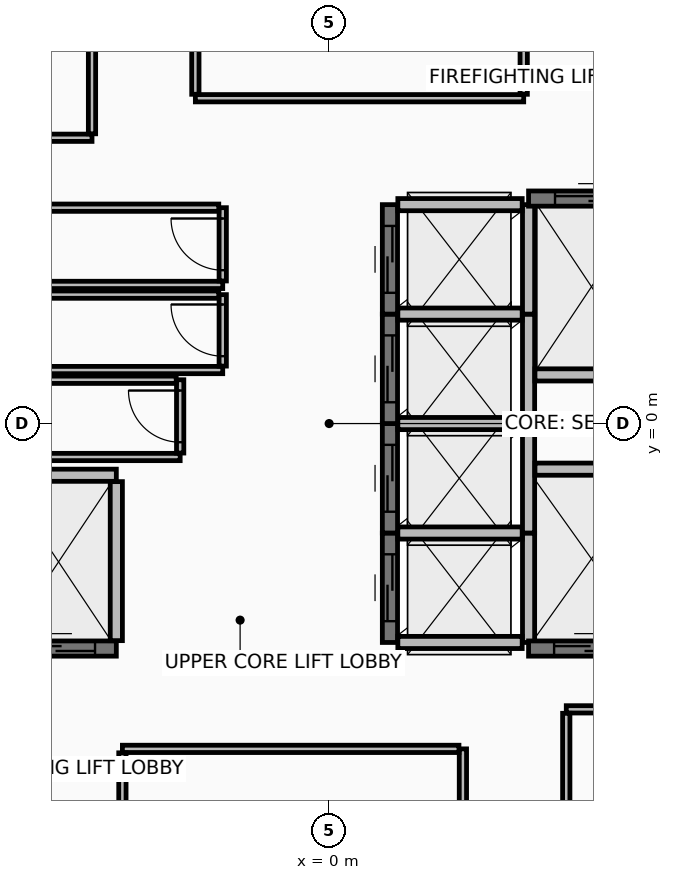
"""IFC4 building model, lengths in metres.
Left out: names, types, materials, properties, quantities, classifications, styles, units other than length and angle.
Written with IfcOpenShell. Run it as: python <this file> out.ifc"""

import sys

from ifc_helpers import new_model, si_unit, direction, frame, frame_2d, origin, place, context, subcontext, project, spatial, rectangle, extrude, element, fill, save


model = new_model("IFC4")
c1 = context("Model", 3, precision=1e-05, world=origin(), true_north=direction((0.0, 1.0)))
c2 = subcontext(c1, "Body", "Model", "MODEL_VIEW")
j1 = project(units=[si_unit("LENGTHUNIT", "METRE"), si_unit("PLANEANGLEUNIT", "RADIAN")], contexts=[c1])
p1 = place(None, origin())
s1 = spatial("IfcSite", under=j1, at=p1, CompositionType="ELEMENT")
p2 = place(p1, origin())
s2 = spatial("IfcBuilding", under=s1, at=p2, CompositionType="ELEMENT")
p3 = place(p2, frame((0.0, 0.0, 253.4)))
s3 = spatial("IfcBuildingStorey", under=s2, at=p3, CompositionType="ELEMENT", Elevation=253.4)
p4 = place(p3, frame((1.0, -3.6, 0.0), z_axis=(0.0, 0.0, 1.0), x_axis=(0.0, 1.0, 0.0)))
e1 = element("IfcWall", 1, at=p4, inside=s3, PredefinedType="SHEAR", context=c2, shape_type="SweptSolid", body=[
    extrude(rectangle(XDim=1.8, YDim=0.25, at=frame_2d((0.9, 0.0))), origin(), (0.0, 0.0, 1.0), 3.42),
])
p5 = place(p4, frame((0.35, 0.0, 0.0)))
e2 = element("IfcOpeningElement", 2, at=p5, cuts=e1, PredefinedType="OPENING", context=c2, shape_type="SweptSolid", body=[
    extrude(rectangle(XDim=1.1, YDim=2.2, at=frame_2d((0.55, 1.1))), frame((0.0, 0.135, 0.0), z_axis=(0.0, -1.0, 0.0), x_axis=(1.0, 0.0, 0.0)), (0.0, 0.0, 1.0), 0.27),
])
p6 = place(p3, frame((3.28, -3.6, 0.0), z_axis=(0.0, 0.0, 1.0), x_axis=(0.0, 1.0, 0.0)))
e3 = element("IfcWall", 3, at=p6, inside=s3, PredefinedType="PARTITIONING", context=c2, shape_type="SweptSolid", body=[
    extrude(rectangle(XDim=1.8, YDim=0.2, at=frame_2d((0.9, 0.0))), origin(), (0.0, 0.0, 1.0), 3.42),
])
for number, where, z_axis, x_axis in (
    (4, (1.13, -3.6, 0.0), (0.0, 0.0, 1.0), (1.0, 0.0, 0.0)),
    (5, (1.13, -1.8, 0.0), (0.0, 0.0, 1.0), (1.0, 0.0, 0.0)),
):
    element("IfcWall", number, at=place(p3, frame(where, z_axis=z_axis, x_axis=x_axis)), inside=s3, PredefinedType="PARTITIONING", context=c2, shape_type="SweptSolid", body=[
        extrude(rectangle(XDim=2.045, YDim=0.2, at=frame_2d((1.022, 0.0))), origin(), (0.0, 0.0, 1.0), 3.42),
    ])
p7 = place(p3, frame((1.0, -1.8, 0.0), z_axis=(0.0, 0.0, 1.0), x_axis=(0.0, 1.0, 0.0)))
e6 = element("IfcWall", 6, at=p7, inside=s3, PredefinedType="SHEAR", context=c2, shape_type="SweptSolid", body=[
    extrude(rectangle(XDim=1.8, YDim=0.25, at=frame_2d((0.9, 0.0))), origin(), (0.0, 0.0, 1.0), 3.42),
])
p8 = place(p7, frame((0.35, 0.0, 0.0)))
e7 = element("IfcOpeningElement", 7, at=p8, cuts=e6, PredefinedType="OPENING", context=c2, shape_type="SweptSolid", body=[
    extrude(rectangle(XDim=1.1, YDim=2.2, at=frame_2d((0.55, 1.1))), frame((0.0, 0.135, 0.0), z_axis=(0.0, -1.0, 0.0), x_axis=(1.0, 0.0, 0.0)), (0.0, 0.0, 1.0), 0.27),
])
p9 = place(p3, frame((3.28, -1.8, 0.0), z_axis=(0.0, 0.0, 1.0), x_axis=(0.0, 1.0, 0.0)))
e8 = element("IfcWall", 8, at=p9, inside=s3, PredefinedType="PARTITIONING", context=c2, shape_type="SweptSolid", body=[
    extrude(rectangle(XDim=1.8, YDim=0.2, at=frame_2d((0.9, 0.0))), origin(), (0.0, 0.0, 1.0), 3.42),
])
p10 = place(p3, frame((1.13, 0.0, 0.0), z_axis=(0.0, 0.0, 1.0), x_axis=(1.0, 0.0, 0.0)))
e9 = element("IfcWall", 9, at=p10, inside=s3, PredefinedType="PARTITIONING", context=c2, shape_type="SweptSolid", body=[
    extrude(rectangle(XDim=2.045, YDim=0.2, at=frame_2d((1.022, 0.0))), origin(), (0.0, 0.0, 1.0), 3.42),
])
p11 = place(p3, frame((1.0, 0.0, 0.0), z_axis=(0.0, 0.0, 1.0), x_axis=(0.0, 1.0, 0.0)))
e10 = element("IfcWall", 10, at=p11, inside=s3, PredefinedType="SHEAR", context=c2, shape_type="SweptSolid", body=[
    extrude(rectangle(XDim=1.8, YDim=0.25, at=frame_2d((0.9, 0.0))), origin(), (0.0, 0.0, 1.0), 3.42),
])
p12 = place(p11, frame((0.35, 0.0, 0.0)))
e11 = element("IfcOpeningElement", 11, at=p12, cuts=e10, PredefinedType="OPENING", context=c2, shape_type="SweptSolid", body=[
    extrude(rectangle(XDim=1.1, YDim=2.2, at=frame_2d((0.55, 1.1))), frame((0.0, 0.135, 0.0), z_axis=(0.0, -1.0, 0.0), x_axis=(1.0, 0.0, 0.0)), (0.0, 0.0, 1.0), 0.27),
])
p13 = place(p3, frame((3.28, 0.0, 0.0), z_axis=(0.0, 0.0, 1.0), x_axis=(0.0, 1.0, 0.0)))
e12 = element("IfcWall", 12, at=p13, inside=s3, PredefinedType="PARTITIONING", context=c2, shape_type="SweptSolid", body=[
    extrude(rectangle(XDim=1.8, YDim=0.2, at=frame_2d((0.9, 0.0))), origin(), (0.0, 0.0, 1.0), 3.42),
])
p14 = place(p3, frame((1.13, 1.8, 0.0), z_axis=(0.0, 0.0, 1.0), x_axis=(1.0, 0.0, 0.0)))
e13 = element("IfcWall", 13, at=p14, inside=s3, PredefinedType="PARTITIONING", context=c2, shape_type="SweptSolid", body=[
    extrude(rectangle(XDim=2.045, YDim=0.2, at=frame_2d((1.022, 0.0))), origin(), (0.0, 0.0, 1.0), 3.42),
])
p15 = place(p3, frame((1.0, 1.8, 0.0), z_axis=(0.0, 0.0, 1.0), x_axis=(0.0, 1.0, 0.0)))
e14 = element("IfcWall", 14, at=p15, inside=s3, PredefinedType="SHEAR", context=c2, shape_type="SweptSolid", body=[
    extrude(rectangle(XDim=1.8, YDim=0.25, at=frame_2d((0.9, 0.0))), origin(), (0.0, 0.0, 1.0), 3.42),
])
p16 = place(p15, frame((0.35, 0.0, 0.0)))
e15 = element("IfcOpeningElement", 15, at=p16, cuts=e14, PredefinedType="OPENING", context=c2, shape_type="SweptSolid", body=[
    extrude(rectangle(XDim=1.1, YDim=2.2, at=frame_2d((0.55, 1.1))), frame((0.0, 0.135, 0.0), z_axis=(0.0, -1.0, 0.0), x_axis=(1.0, 0.0, 0.0)), (0.0, 0.0, 1.0), 0.27),
])
p17 = place(p3, frame((3.28, 1.8, 0.0), z_axis=(0.0, 0.0, 1.0), x_axis=(0.0, 1.0, 0.0)))
e16 = element("IfcWall", 16, at=p17, inside=s3, PredefinedType="PARTITIONING", context=c2, shape_type="SweptSolid", body=[
    extrude(rectangle(XDim=1.8, YDim=0.2, at=frame_2d((0.9, 0.0))), origin(), (0.0, 0.0, 1.0), 3.42),
])
p18 = place(p3, frame((1.13, 3.6, 0.0), z_axis=(0.0, 0.0, 1.0), x_axis=(1.0, 0.0, 0.0)))
e17 = element("IfcWall", 17, at=p18, inside=s3, PredefinedType="PARTITIONING", context=c2, shape_type="SweptSolid", body=[
    extrude(rectangle(XDim=2.045, YDim=0.2, at=frame_2d((1.022, 0.0))), origin(), (0.0, 0.0, 1.0), 2.715),
])
p19 = place(p3, frame((-5.4, -3.7, 0.0), z_axis=(0.0, 0.0, 1.0), x_axis=(1.0, 0.0, 0.0)))
e18 = element("IfcWall", 18, at=p19, inside=s3, PredefinedType="SHEAR", context=c2, shape_type="SweptSolid", body=[
    extrude(rectangle(XDim=1.9, YDim=0.25, at=frame_2d((0.95, 0.0))), origin(), (0.0, 0.0, 1.0), 3.42),
])
p20 = place(p19, frame((0.35, 0.0, 0.0)))
e19 = element("IfcOpeningElement", 19, at=p20, cuts=e18, PredefinedType="OPENING", context=c2, shape_type="SweptSolid", body=[
    extrude(rectangle(XDim=1.2, YDim=2.2, at=frame_2d((0.6, 1.1))), frame((0.0, 0.135, 0.0), z_axis=(0.0, -1.0, 0.0), x_axis=(1.0, 0.0, 0.0)), (0.0, 0.0, 1.0), 0.27),
])
p21 = place(p3, frame((-5.27, -0.85, 0.0), z_axis=(0.0, 0.0, 1.0), x_axis=(1.0, 0.0, 0.0)))
e20 = element("IfcWall", 20, at=p21, inside=s3, PredefinedType="PARTITIONING", context=c2, shape_type="SweptSolid", body=[
    extrude(rectangle(XDim=1.77, YDim=0.2, at=frame_2d((0.885, 0.0))), origin(), (0.0, 0.0, 1.0), 3.42),
])
p22 = place(p3, frame((-3.5, -3.57, 0.0), z_axis=(0.0, 0.0, 1.0), x_axis=(0.0, 1.0, 0.0)))
e21 = element("IfcWall", 21, at=p22, inside=s3, PredefinedType="PARTITIONING", context=c2, shape_type="SweptSolid", body=[
    extrude(rectangle(XDim=2.615, YDim=0.2, at=frame_2d((1.308, 0.0))), origin(), (0.0, 0.0, 1.0), 3.42),
])
p23 = place(p3, frame((3.28, 3.7, 0.0), z_axis=(0.0, 0.0, 1.0), x_axis=(1.0, 0.0, 0.0)))
e22 = element("IfcWall", 22, at=p23, inside=s3, PredefinedType="SHEAR", context=c2, shape_type="SweptSolid", body=[
    extrude(rectangle(XDim=2.07, YDim=0.25, at=frame_2d((1.035, 0.0))), origin(), (0.0, 0.0, 1.0), 3.42),
])
p24 = place(p23, frame((0.435, 0.0, 0.0)))
e23 = element("IfcOpeningElement", 23, at=p24, cuts=e22, PredefinedType="OPENING", context=c2, shape_type="SweptSolid", body=[
    extrude(rectangle(XDim=1.2, YDim=2.2, at=frame_2d((0.6, 1.1))), frame((0.0, 0.135, 0.0), z_axis=(0.0, -1.0, 0.0), x_axis=(1.0, 0.0, 0.0)), (0.0, 0.0, 1.0), 0.27),
])
p25 = place(p3, frame((3.385, 0.8, 0.0), z_axis=(0.0, 0.0, 1.0), x_axis=(1.0, 0.0, 0.0)))
e24 = element("IfcWall", 24, at=p25, inside=s3, PredefinedType="PARTITIONING", context=c2, shape_type="SweptSolid", body=[
    extrude(rectangle(XDim=1.835, YDim=0.2, at=frame_2d((0.917, 0.0))), origin(), (0.0, 0.0, 1.0), 3.42),
])
p26 = place(p3, frame((3.28, -3.7, 0.0), z_axis=(0.0, 0.0, 1.0), x_axis=(1.0, 0.0, 0.0)))
e25 = element("IfcWall", 25, at=p26, inside=s3, PredefinedType="SHEAR", context=c2, shape_type="SweptSolid", body=[
    extrude(rectangle(XDim=1.94, YDim=0.25, at=frame_2d((0.97, 0.0))), origin(), (0.0, 0.0, 1.0), 3.42),
])
p27 = place(p26, frame((0.42, 0.0, 0.0)))
e26 = element("IfcOpeningElement", 26, at=p27, cuts=e25, PredefinedType="OPENING", context=c2, shape_type="SweptSolid", body=[
    extrude(rectangle(XDim=1.1, YDim=2.2, at=frame_2d((0.55, 1.1))), frame((0.0, 0.135, 0.0), z_axis=(0.0, -1.0, 0.0), x_axis=(1.0, 0.0, 0.0)), (0.0, 0.0, 1.0), 0.27),
])
p28 = place(p3, frame((3.385, -0.75, 0.0), z_axis=(0.0, 0.0, 1.0), x_axis=(1.0, 0.0, 0.0)))
e27 = element("IfcWall", 27, at=p28, inside=s3, PredefinedType="PARTITIONING", context=c2, shape_type="SweptSolid", body=[
    extrude(rectangle(XDim=1.835, YDim=0.2, at=frame_2d((0.917, 0.0))), origin(), (0.0, 0.0, 1.0), 3.42),
])
p29 = place(p3, frame((-5.22, 2.28, 0.0), z_axis=(0.0, 0.0, 1.0), x_axis=(1.0, 0.0, 0.0)))
e28 = element("IfcWall", 28, at=p29, inside=s3, PredefinedType="PARTITIONING", context=c2, shape_type="SweptSolid", body=[
    extrude(rectangle(XDim=3.47, YDim=0.12, at=frame_2d((1.735, 0.0))), origin(), (0.0, 0.0, 1.0), 3.42),
])
p30 = place(p3, frame((-1.75, 2.345, 0.0), z_axis=(0.0, 0.0, 1.0), x_axis=(0.0, 1.0, 0.0)))
e29 = element("IfcWall", 29, at=p30, inside=s3, PredefinedType="PARTITIONING", context=c2, shape_type="SweptSolid", body=[
    extrude(rectangle(XDim=1.205, YDim=0.12, at=frame_2d((0.603, 0.0))), origin(), (0.0, 0.0, 1.0), 3.42),
])
p31 = place(p30, frame((0.177, 0.0, 0.0)))
e30 = element("IfcOpeningElement", 30, at=p31, cuts=e29, PredefinedType="OPENING", context=c2, shape_type="SweptSolid", body=[
    extrude(rectangle(XDim=0.85, YDim=2.1, at=frame_2d((0.425, 1.05))), frame((0.0, 0.07, 0.0), z_axis=(0.0, -1.0, 0.0), x_axis=(1.0, 0.0, 0.0)), (0.0, 0.0, 1.0), 0.14),
])
p32 = place(p3, frame((-1.815, 3.55, 0.0), z_axis=(0.0, 0.0, 1.0), x_axis=(-1.0, 0.0, 0.0)))
e31 = element("IfcWall", 31, at=p32, inside=s3, PredefinedType="PARTITIONING", context=c2, shape_type="SweptSolid", body=[
    extrude(rectangle(XDim=3.405, YDim=0.12, at=frame_2d((1.703, 0.0))), origin(), (0.0, 0.0, 1.0), 3.42),
])
p33 = place(p3, frame((-5.22, 0.88, 0.0), z_axis=(0.0, 0.0, 1.0), x_axis=(1.0, 0.0, 0.0)))
e32 = element("IfcWall", 32, at=p33, inside=s3, PredefinedType="PARTITIONING", context=c2, shape_type="SweptSolid", body=[
    extrude(rectangle(XDim=3.47, YDim=0.12, at=frame_2d((1.735, 0.0))), origin(), (0.0, 0.0, 1.0), 3.42),
])
p34 = place(p3, frame((-1.75, 0.945, 0.0), z_axis=(0.0, 0.0, 1.0), x_axis=(0.0, 1.0, 0.0)))
e33 = element("IfcWall", 33, at=p34, inside=s3, PredefinedType="PARTITIONING", context=c2, shape_type="SweptSolid", body=[
    extrude(rectangle(XDim=1.175, YDim=0.12, at=frame_2d((0.587, 0.0))), origin(), (0.0, 0.0, 1.0), 3.42),
])
p35 = place(p34, frame((0.163, 0.0, 0.0)))
e34 = element("IfcOpeningElement", 34, at=p35, cuts=e33, PredefinedType="OPENING", context=c2, shape_type="SweptSolid", body=[
    extrude(rectangle(XDim=0.85, YDim=2.1, at=frame_2d((0.425, 1.05))), frame((0.0, 0.07, 0.0), z_axis=(0.0, -1.0, 0.0), x_axis=(1.0, 0.0, 0.0)), (0.0, 0.0, 1.0), 0.14),
])
p36 = place(p3, frame((-1.815, 2.12, 0.0), z_axis=(0.0, 0.0, 1.0), x_axis=(-1.0, 0.0, 0.0)))
e35 = element("IfcWall", 35, at=p36, inside=s3, PredefinedType="PARTITIONING", context=c2, shape_type="SweptSolid", body=[
    extrude(rectangle(XDim=3.405, YDim=0.12, at=frame_2d((1.703, 0.0))), origin(), (0.0, 0.0, 1.0), 3.42),
])
p37 = place(p3, frame((-5.22, -0.55, 0.0), z_axis=(0.0, 0.0, 1.0), x_axis=(1.0, 0.0, 0.0)))
e36 = element("IfcWall", 36, at=p37, inside=s3, PredefinedType="PARTITIONING", context=c2, shape_type="SweptSolid", body=[
    extrude(rectangle(XDim=2.77, YDim=0.12, at=frame_2d((1.385, 0.0))), origin(), (0.0, 0.0, 1.0), 3.42),
])
p38 = place(p3, frame((-2.45, -0.485, 0.0), z_axis=(0.0, 0.0, 1.0), x_axis=(0.0, 1.0, 0.0)))
e37 = element("IfcWall", 37, at=p38, inside=s3, PredefinedType="PARTITIONING", context=c2, shape_type="SweptSolid", body=[
    extrude(rectangle(XDim=1.205, YDim=0.12, at=frame_2d((0.603, 0.0))), origin(), (0.0, 0.0, 1.0), 3.42),
])
p39 = place(p38, frame((0.178, 0.0, 0.0)))
e38 = element("IfcOpeningElement", 38, at=p39, cuts=e37, PredefinedType="OPENING", context=c2, shape_type="SweptSolid", body=[
    extrude(rectangle(XDim=0.85, YDim=2.1, at=frame_2d((0.425, 1.05))), frame((0.0, 0.07, 0.0), z_axis=(0.0, -1.0, 0.0), x_axis=(1.0, 0.0, 0.0)), (0.0, 0.0, 1.0), 0.14),
])
p40 = place(p3, frame((-2.515, 0.72, 0.0), z_axis=(0.0, 0.0, 1.0), x_axis=(-1.0, 0.0, 0.0)))
e39 = element("IfcWall", 39, at=p40, inside=s3, PredefinedType="PARTITIONING", context=c2, shape_type="SweptSolid", body=[
    extrude(rectangle(XDim=2.705, YDim=0.12, at=frame_2d((1.353, 0.0))), origin(), (0.0, 0.0, 1.0), 3.42),
])
p41 = place(p3, frame((2.2, -7.42, 0.0), z_axis=(0.0, 0.0, 1.0), x_axis=(0.0, 1.0, 0.0)))
e40 = element("IfcWall", 40, at=p41, inside=s3, PredefinedType="PARTITIONING", context=c2, shape_type="SweptSolid", body=[
    extrude(rectangle(XDim=2.07, YDim=0.12, at=frame_2d((1.035, 0.0))), origin(), (0.0, 0.0, 1.0), 2.715),
])
p42 = place(p3, frame((2.135, -5.35, 0.0), z_axis=(0.0, 0.0, 1.0), x_axis=(-1.0, 0.0, 0.0)))
e41 = element("IfcWall", 41, at=p42, inside=s3, PredefinedType="PARTITIONING", context=c2, shape_type="SweptSolid", body=[
    extrude(rectangle(XDim=5.535, YDim=0.12, at=frame_2d((2.768, 0.0))), origin(), (0.0, 0.0, 1.0), 2.715),
])
p43 = place(p3, frame((-3.4, -5.415, 0.0), z_axis=(0.0, 0.0, 1.0), x_axis=(0.0, -1.0, 0.0)))
e42 = element("IfcWall", 42, at=p43, inside=s3, PredefinedType="PARTITIONING", context=c2, shape_type="SweptSolid", body=[
    extrude(rectangle(XDim=2.8, YDim=0.12, at=frame_2d((1.4, 0.0))), origin(), (0.0, 0.0, 1.0), 2.715),
])
p44 = place(p3, frame((-2.2, 5.35, 0.0), z_axis=(0.0, 0.0, 1.0), x_axis=(1.0, 0.0, 0.0)))
e43 = element("IfcWall", 43, at=p44, inside=s3, PredefinedType="PARTITIONING", context=c2, shape_type="SweptSolid", body=[
    extrude(rectangle(XDim=5.4, YDim=0.12, at=frame_2d((2.7, 0.0))), origin(), (0.0, 0.0, 1.0), 2.715),
])
p45 = place(p3, frame((3.2, 5.415, 0.0), z_axis=(0.0, 0.0, 1.0), x_axis=(0.0, 1.0, 0.0)))
e44 = element("IfcWall", 44, at=p45, inside=s3, PredefinedType="PARTITIONING", context=c2, shape_type="SweptSolid", body=[
    extrude(rectangle(XDim=2.8, YDim=0.12, at=frame_2d((1.4, 0.0))), origin(), (0.0, 0.0, 1.0), 2.715),
])
p46 = place(p3, frame((-2.2, 7.42, 0.0), z_axis=(0.0, 0.0, 1.0), x_axis=(0.0, -1.0, 0.0)))
e45 = element("IfcWall", 45, at=p46, inside=s3, PredefinedType="PARTITIONING", context=c2, shape_type="SweptSolid", body=[
    extrude(rectangle(XDim=2.005, YDim=0.12, at=frame_2d((1.002, 0.0))), origin(), (0.0, 0.0, 1.0), 2.715),
])
p47 = place(p3, frame((-5.35, 4.7, 0.0), z_axis=(0.0, 0.0, 1.0), x_axis=(1.0, 0.0, 0.0)))
e46 = element("IfcWall", 46, at=p47, inside=s3, PredefinedType="PARTITIONING", context=c2, shape_type="SweptSolid", body=[
    extrude(rectangle(XDim=1.45, YDim=0.12, at=frame_2d((0.725, 0.0))), origin(), (0.0, 0.0, 1.0), 3.42),
])
p48 = place(p3, frame((-3.9, 4.765, 0.0), z_axis=(0.0, 0.0, 1.0), x_axis=(0.0, 1.0, 0.0)))
e47 = element("IfcWall", 47, at=p48, inside=s3, PredefinedType="PARTITIONING", context=c2, shape_type="SweptSolid", body=[
    extrude(rectangle(XDim=3.45, YDim=0.12, at=frame_2d((1.725, 0.0))), origin(), (0.0, 0.0, 1.0), 2.715),
])
p49 = place(p3, frame((5.785, -4.7, 0.0), z_axis=(0.0, 0.0, 1.0), x_axis=(-1.0, 0.0, 0.0)))
e48 = element("IfcWall", 48, at=p49, inside=s3, PredefinedType="PARTITIONING", context=c2, shape_type="SweptSolid", body=[
    extrude(rectangle(XDim=1.885, YDim=0.12, at=frame_2d((0.942, 0.0))), origin(), (0.0, 0.0, 1.0), 3.42),
])
p50 = place(p3, frame((3.9, -4.765, 0.0), z_axis=(0.0, 0.0, 1.0), x_axis=(0.0, -1.0, 0.0)))
e49 = element("IfcWall", 49, at=p50, inside=s3, PredefinedType="PARTITIONING", context=c2, shape_type="SweptSolid", body=[
    extrude(rectangle(XDim=3.45, YDim=0.12, at=frame_2d((1.725, 0.0))), origin(), (0.0, 0.0, 1.0), 2.715),
])
p51 = place(p5, origin())
e50 = element("IfcDoor", 50, at=p51, inside=s3, OperationType="SLIDING_TO_LEFT", PredefinedType="DOOR", context=c2, shape_type="SweptSolid", body=[
    extrude(rectangle(XDim=1.1, YDim=2.2, at=frame_2d((0.55, 1.1))), frame((0.0, 0.025, 0.0), z_axis=(0.0, -1.0, 0.0), x_axis=(1.0, 0.0, 0.0)), (0.0, 0.0, 1.0), 0.05),
])
fill(e2, e50)
p52 = place(p8, origin())
e51 = element("IfcDoor", 51, at=p52, inside=s3, OperationType="SLIDING_TO_LEFT", PredefinedType="DOOR", context=c2, shape_type="SweptSolid", body=[
    extrude(rectangle(XDim=1.1, YDim=2.2, at=frame_2d((0.55, 1.1))), frame((0.0, 0.025, 0.0), z_axis=(0.0, -1.0, 0.0), x_axis=(1.0, 0.0, 0.0)), (0.0, 0.0, 1.0), 0.05),
])
fill(e7, e51)
p53 = place(p12, origin())
e52 = element("IfcDoor", 52, at=p53, inside=s3, OperationType="SLIDING_TO_LEFT", PredefinedType="DOOR", context=c2, shape_type="SweptSolid", body=[
    extrude(rectangle(XDim=1.1, YDim=2.2, at=frame_2d((0.55, 1.1))), frame((0.0, 0.025, 0.0), z_axis=(0.0, -1.0, 0.0), x_axis=(1.0, 0.0, 0.0)), (0.0, 0.0, 1.0), 0.05),
])
fill(e11, e52)
p54 = place(p16, origin())
e53 = element("IfcDoor", 53, at=p54, inside=s3, OperationType="SLIDING_TO_LEFT", PredefinedType="DOOR", context=c2, shape_type="SweptSolid", body=[
    extrude(rectangle(XDim=1.1, YDim=2.2, at=frame_2d((0.55, 1.1))), frame((0.0, 0.025, 0.0), z_axis=(0.0, -1.0, 0.0), x_axis=(1.0, 0.0, 0.0)), (0.0, 0.0, 1.0), 0.05),
])
fill(e15, e53)
p55 = place(p20, origin())
e54 = element("IfcDoor", 54, at=p55, inside=s3, OperationType="SLIDING_TO_RIGHT", PredefinedType="DOOR", context=c2, shape_type="SweptSolid", body=[
    extrude(rectangle(XDim=1.2, YDim=2.2, at=frame_2d((0.6, 1.1))), frame((0.0, 0.025, 0.0), z_axis=(0.0, -1.0, 0.0), x_axis=(1.0, 0.0, 0.0)), (0.0, 0.0, 1.0), 0.05),
])
fill(e19, e54)
p56 = place(p24, origin())
e55 = element("IfcDoor", 55, at=p56, inside=s3, OperationType="SLIDING_TO_RIGHT", PredefinedType="DOOR", context=c2, shape_type="SweptSolid", body=[
    extrude(rectangle(XDim=1.2, YDim=2.2, at=frame_2d((0.6, 1.1))), frame((0.0, 0.025, 0.0), z_axis=(0.0, -1.0, 0.0), x_axis=(1.0, 0.0, 0.0)), (0.0, 0.0, 1.0), 0.05),
])
fill(e23, e55)
p57 = place(p27, origin())
e56 = element("IfcDoor", 56, at=p57, inside=s3, OperationType="SLIDING_TO_LEFT", PredefinedType="DOOR", context=c2, shape_type="SweptSolid", body=[
    extrude(rectangle(XDim=1.1, YDim=2.2, at=frame_2d((0.55, 1.1))), frame((0.0, 0.025, 0.0), z_axis=(0.0, -1.0, 0.0), x_axis=(1.0, 0.0, 0.0)), (0.0, 0.0, 1.0), 0.05),
])
fill(e26, e56)
p58 = place(p31, frame((0.85, 0.0, 0.0), z_axis=(0.0, 0.0, 1.0), x_axis=(-1.0, 0.0, 0.0)))
e57 = element("IfcDoor", 57, at=p58, inside=s3, OperationType="SINGLE_SWING_RIGHT", PredefinedType="DOOR", context=c2, shape_type="SweptSolid", body=[
    extrude(rectangle(XDim=0.85, YDim=2.1, at=frame_2d((0.425, 1.05))), frame((0.0, 0.025, 0.0), z_axis=(0.0, -1.0, 0.0), x_axis=(1.0, 0.0, 0.0)), (0.0, 0.0, 1.0), 0.05),
])
fill(e30, e57)
p59 = place(p35, frame((0.85, 0.0, 0.0), z_axis=(0.0, 0.0, 1.0), x_axis=(-1.0, 0.0, 0.0)))
e58 = element("IfcDoor", 58, at=p59, inside=s3, OperationType="SINGLE_SWING_RIGHT", PredefinedType="DOOR", context=c2, shape_type="SweptSolid", body=[
    extrude(rectangle(XDim=0.85, YDim=2.1, at=frame_2d((0.425, 1.05))), frame((0.0, 0.025, 0.0), z_axis=(0.0, -1.0, 0.0), x_axis=(1.0, 0.0, 0.0)), (0.0, 0.0, 1.0), 0.05),
])
fill(e34, e58)
p60 = place(p39, frame((0.85, 0.0, 0.0), z_axis=(0.0, 0.0, 1.0), x_axis=(-1.0, 0.0, 0.0)))
e59 = element("IfcDoor", 59, at=p60, inside=s3, OperationType="SINGLE_SWING_RIGHT", PredefinedType="DOOR", context=c2, shape_type="SweptSolid", body=[
    extrude(rectangle(XDim=0.85, YDim=2.1, at=frame_2d((0.425, 1.05))), frame((0.0, 0.025, 0.0), z_axis=(0.0, -1.0, 0.0), x_axis=(1.0, 0.0, 0.0)), (0.0, 0.0, 1.0), 0.05),
])
fill(e38, e59)
save(model, sys.argv[1])
